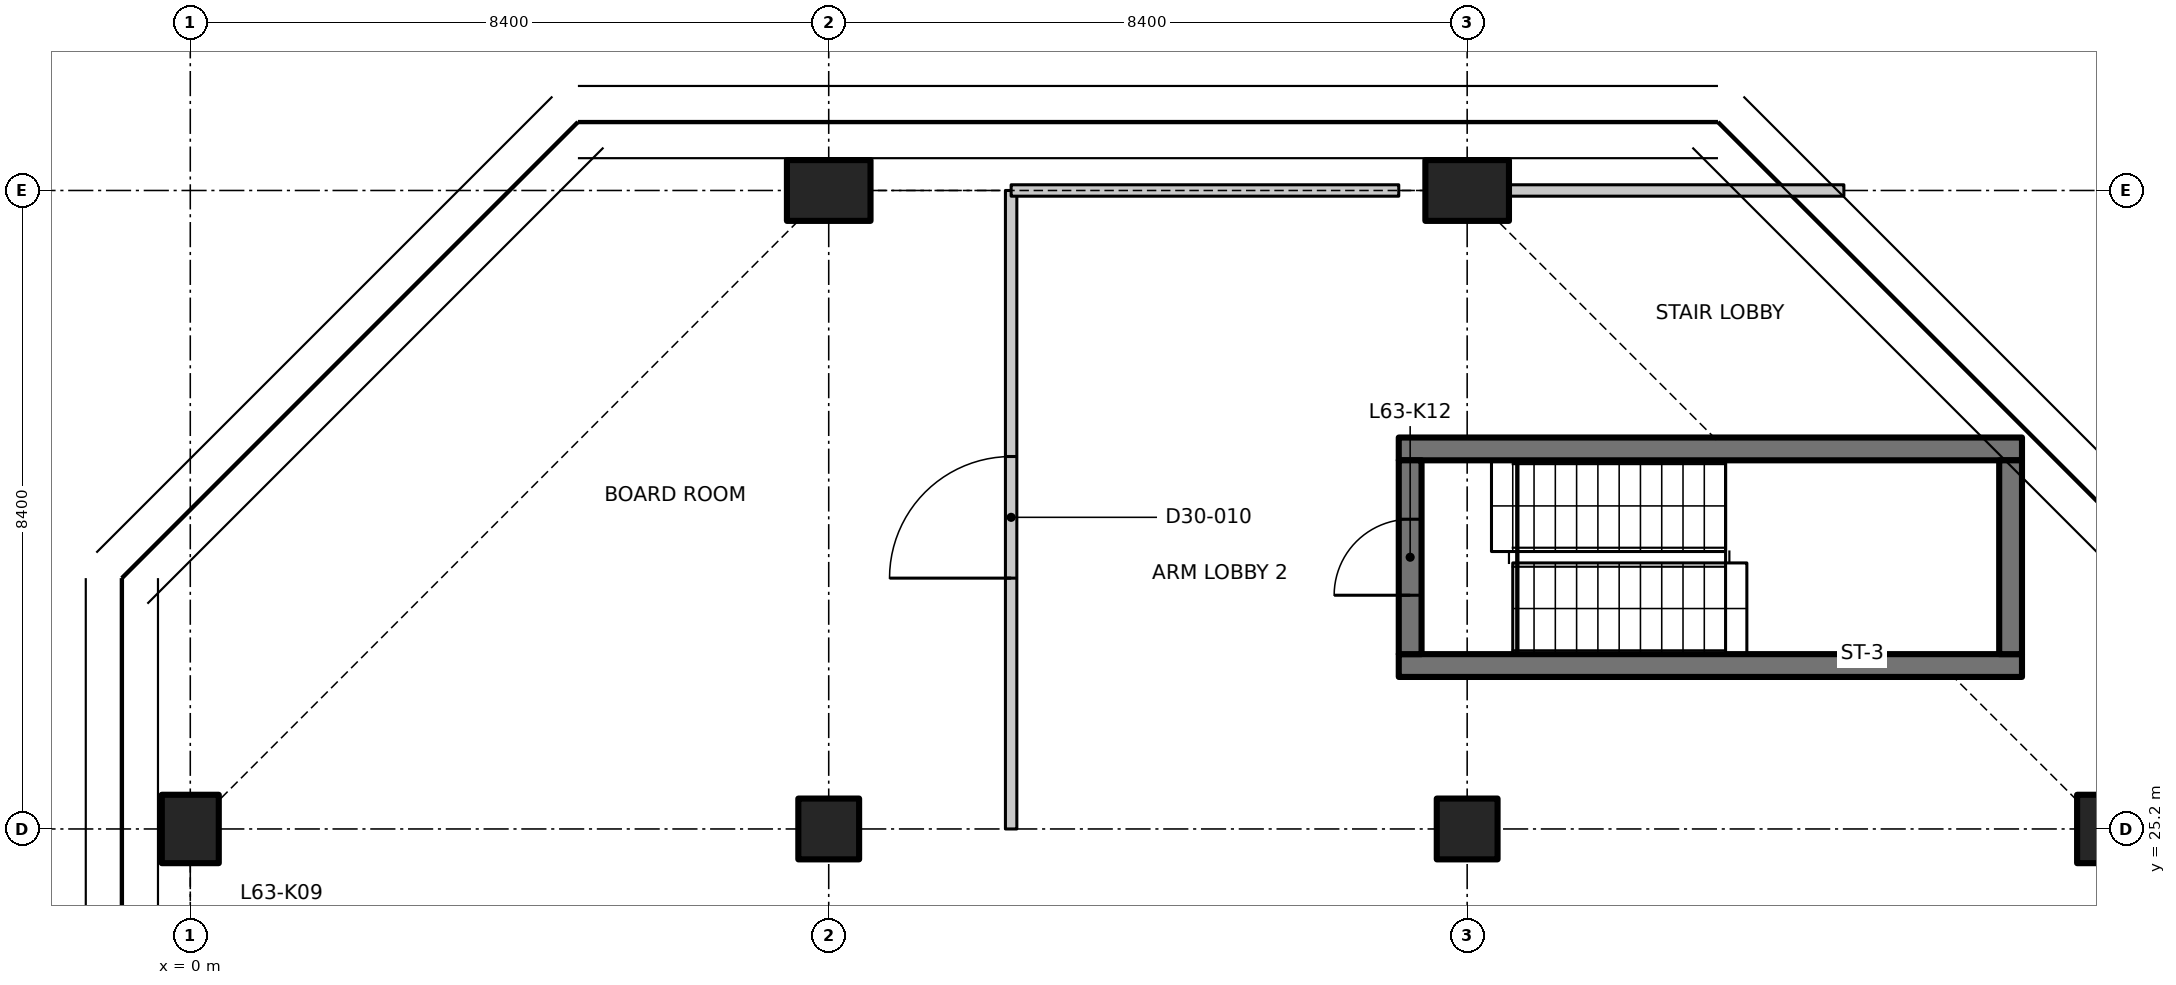
"""IFC4 building model, lengths in metres.
Left out: names, types, materials, properties, quantities, classifications, styles, units other than length and angle.
Written with IfcOpenShell. Run it as: python <this file> out.ifc"""

import sys

from ifc_helpers import new_model, si_unit, direction, frame, frame_2d, origin, origin_2d, place, context, subcontext, project, spatial, polyline, rectangle, outline, extrude, element, fill, save


model = new_model("IFC4")
c1 = context("Model", 3, precision=1e-05, world=origin(), true_north=direction((0.0, 1.0)))
c2 = subcontext(c1, "Body", "Model", "MODEL_VIEW")
j1 = project(units=[si_unit("LENGTHUNIT", "METRE"), si_unit("PLANEANGLEUNIT", "RADIAN")], contexts=[c1])
p1 = place(None, origin())
s1 = spatial("IfcSite", under=j1, at=p1, CompositionType="ELEMENT")
p2 = place(p1, origin())
s2 = spatial("IfcBuilding", under=s1, at=p2, CompositionType="ELEMENT")
p3 = place(p2, frame((0.0, 0.0, 248.1)))
s3 = spatial("IfcBuildingStorey", under=s2, at=p3, CompositionType="ELEMENT", Elevation=248.1)
p4 = place(p3, frame((0.0, 25.2, 0.0), z_axis=(0.0, 0.0, 1.0), x_axis=(1.0, 0.0, 0.0)))
e1 = element("IfcColumn", 1, at=p4, inside=s3, PredefinedType="COLUMN", context=c2, shape_type="SweptSolid", body=[
    extrude(rectangle(XDim=0.75, YDim=0.9, at=origin_2d()), origin(), (0.0, 0.0, 1.0), 3.35),
])
p5 = place(p3, frame((8.4, 25.2, 0.0), z_axis=(0.0, 0.0, 1.0), x_axis=(1.0, 0.0, 0.0)))
e2 = element("IfcColumn", 2, at=p5, inside=s3, PredefinedType="COLUMN", context=c2, shape_type="SweptSolid", body=[
    extrude(rectangle(XDim=0.8, YDim=0.8, at=origin_2d()), origin(), (0.0, 0.0, 1.0), 3.35),
])
p6 = place(p3, frame((8.4, 33.6, 0.0), z_axis=(0.0, 0.0, 1.0), x_axis=(0.0, 1.0, 0.0)))
e3 = element("IfcColumn", 3, at=p6, inside=s3, PredefinedType="COLUMN", context=c2, shape_type="SweptSolid", body=[
    extrude(rectangle(XDim=0.8, YDim=1.1, at=origin_2d()), origin(), (0.0, 0.0, 1.0), 3.35),
])
p7 = place(p3, frame((16.8, 25.2, 0.0), z_axis=(0.0, 0.0, 1.0), x_axis=(1.0, 0.0, 0.0)))
e4 = element("IfcColumn", 4, at=p7, inside=s3, PredefinedType="COLUMN", context=c2, shape_type="SweptSolid", body=[
    extrude(rectangle(XDim=0.8, YDim=0.8, at=origin_2d()), origin(), (0.0, 0.0, 1.0), 3.35),
])
p8 = place(p3, frame((16.8, 33.6, 0.0), z_axis=(0.0, 0.0, 1.0), x_axis=(0.0, 1.0, 0.0)))
e5 = element("IfcColumn", 5, at=p8, inside=s3, PredefinedType="COLUMN", context=c2, shape_type="SweptSolid", body=[
    extrude(rectangle(XDim=0.8, YDim=1.1, at=origin_2d()), origin(), (0.0, 0.0, 1.0), 3.35),
])
p9 = place(p3, frame((25.2, 25.2, 0.0), z_axis=(0.0, 0.0, 1.0), x_axis=(1.0, 0.0, 0.0)))
e6 = element("IfcColumn", 6, at=p9, inside=s3, PredefinedType="COLUMN", context=c2, shape_type="SweptSolid", body=[
    extrude(rectangle(XDim=0.75, YDim=0.9, at=origin_2d()), origin(), (0.0, 0.0, 1.0), 3.35),
])
for number, where, z_axis, x_axis in (
    (7, (15.9, 27.35, 0.0), (0.0, 0.0, 1.0), (1.0, 0.0, 0.0)),
    (8, (15.9, 30.2, 0.0), (0.0, 0.0, 1.0), (1.0, 0.0, 0.0)),
):
    element("IfcWall", number, at=place(p3, frame(where, z_axis=z_axis, x_axis=x_axis)), inside=s3, PredefinedType="SHEAR", context=c2, shape_type="SweptSolid", body=[
        extrude(rectangle(XDim=8.2, YDim=0.3, at=frame_2d((4.1, 0.0))), origin(), (0.0, 0.0, 1.0), 3.35),
    ])
p10 = place(p3, frame((16.05, 27.5, 0.0), z_axis=(0.0, 0.0, 1.0), x_axis=(0.0, 1.0, 0.0)))
e9 = element("IfcWall", 9, at=p10, inside=s3, PredefinedType="SHEAR", context=c2, shape_type="SweptSolid", body=[
    extrude(rectangle(XDim=2.55, YDim=0.3, at=frame_2d((1.275, 0.0))), origin(), (0.0, 0.0, 1.0), 3.35),
])
p11 = place(p10, frame((0.775, 0.0, 0.0)))
e10 = element("IfcOpeningElement", 10, at=p11, cuts=e9, PredefinedType="OPENING", context=c2, shape_type="SweptSolid", body=[
    extrude(rectangle(XDim=1.0, YDim=2.1, at=frame_2d((0.5, 1.05))), frame((0.0, 0.16, 0.0), z_axis=(0.0, -1.0, 0.0), x_axis=(1.0, 0.0, 0.0)), (0.0, 0.0, 1.0), 0.32),
])
p12 = place(p3, frame((23.95, 27.5, 0.0), z_axis=(0.0, 0.0, 1.0), x_axis=(0.0, 1.0, 0.0)))
e11 = element("IfcWall", 11, at=p12, inside=s3, PredefinedType="SHEAR", context=c2, shape_type="SweptSolid", body=[
    extrude(rectangle(XDim=2.55, YDim=0.3, at=frame_2d((1.275, 0.0))), origin(), (0.0, 0.0, 1.0), 3.35),
])
p13 = place(p3, frame((10.8, 25.2, 0.0), z_axis=(0.0, 0.0, 1.0), x_axis=(0.0, 1.0, 0.0)))
e12 = element("IfcWall", 12, at=p13, inside=s3, PredefinedType="PARTITIONING", context=c2, shape_type="SweptSolid", body=[
    extrude(outline(polyline([(0.0, 0.0), (8.4, 0.0), (8.4, 2.98), (7.952, 2.98), (7.95, 3.33), (0.0, 3.33), (0.0, 0.0)])), frame((0.0, 0.075, 0.0), z_axis=(0.0, -1.0, 0.0), x_axis=(1.0, 0.0, 0.0)), (0.0, 0.0, 1.0), 0.15),
])
p14 = place(p13, frame((3.3, 0.0, 0.0)))
e13 = element("IfcOpeningElement", 13, at=p14, cuts=e12, PredefinedType="OPENING", context=c2, shape_type="SweptSolid", body=[
    extrude(rectangle(XDim=1.6, YDim=2.1, at=frame_2d((0.8, 1.05))), frame((0.0, 0.085, 0.0), z_axis=(0.0, -1.0, 0.0), x_axis=(1.0, 0.0, 0.0)), (0.0, 0.0, 1.0), 0.17),
])
p15 = place(p3, frame((10.8, 33.6, 0.0), z_axis=(0.0, 0.0, 1.0), x_axis=(1.0, 0.0, 0.0)))
e14 = element("IfcWall", 14, at=p15, inside=s3, PredefinedType="PARTITIONING", context=c2, shape_type="SweptSolid", body=[
    extrude(outline(polyline([(0.0, 0.0), (5.1, 0.0), (5.1, 2.98), (0.0, 2.98), (0.0, 0.0)])), frame((0.0, 0.075, 0.0), z_axis=(0.0, -1.0, 0.0), x_axis=(1.0, 0.0, 0.0)), (0.0, 0.0, 1.0), 0.15),
])
p16 = place(p3, frame((17.37, 33.6, 0.0), z_axis=(0.0, 0.0, 1.0), x_axis=(1.0, 0.0, 0.0)))
e15 = element("IfcWall", 15, at=p16, inside=s3, PredefinedType="PARTITIONING", context=c2, shape_type="SweptSolid", body=[
    extrude(rectangle(XDim=4.386, YDim=0.15, at=frame_2d((2.193, 0.0))), origin(), (0.0, 0.0, 1.0), 2.98),
])
p17 = place(p11, origin())
e16 = element("IfcDoor", 16, at=p17, inside=s3, OperationType="SINGLE_SWING_LEFT", PredefinedType="DOOR", context=c2, shape_type="SweptSolid", body=[
    extrude(rectangle(XDim=1.0, YDim=2.1, at=frame_2d((0.5, 1.05))), frame((0.0, 0.025, 0.0), z_axis=(0.0, -1.0, 0.0), x_axis=(1.0, 0.0, 0.0)), (0.0, 0.0, 1.0), 0.05),
])
fill(e10, e16)
p18 = place(p14, origin())
e17 = element("IfcDoor", 17, at=p18, inside=s3, OperationType="DOUBLE_DOOR_SINGLE_SWING", PredefinedType="DOOR", context=c2, shape_type="SweptSolid", body=[
    extrude(rectangle(XDim=1.6, YDim=2.1, at=frame_2d((0.8, 1.05))), frame((0.0, 0.025, 0.0), z_axis=(0.0, -1.0, 0.0), x_axis=(1.0, 0.0, 0.0)), (0.0, 0.0, 1.0), 0.05),
])
fill(e13, e17)
save(model, sys.argv[1])
